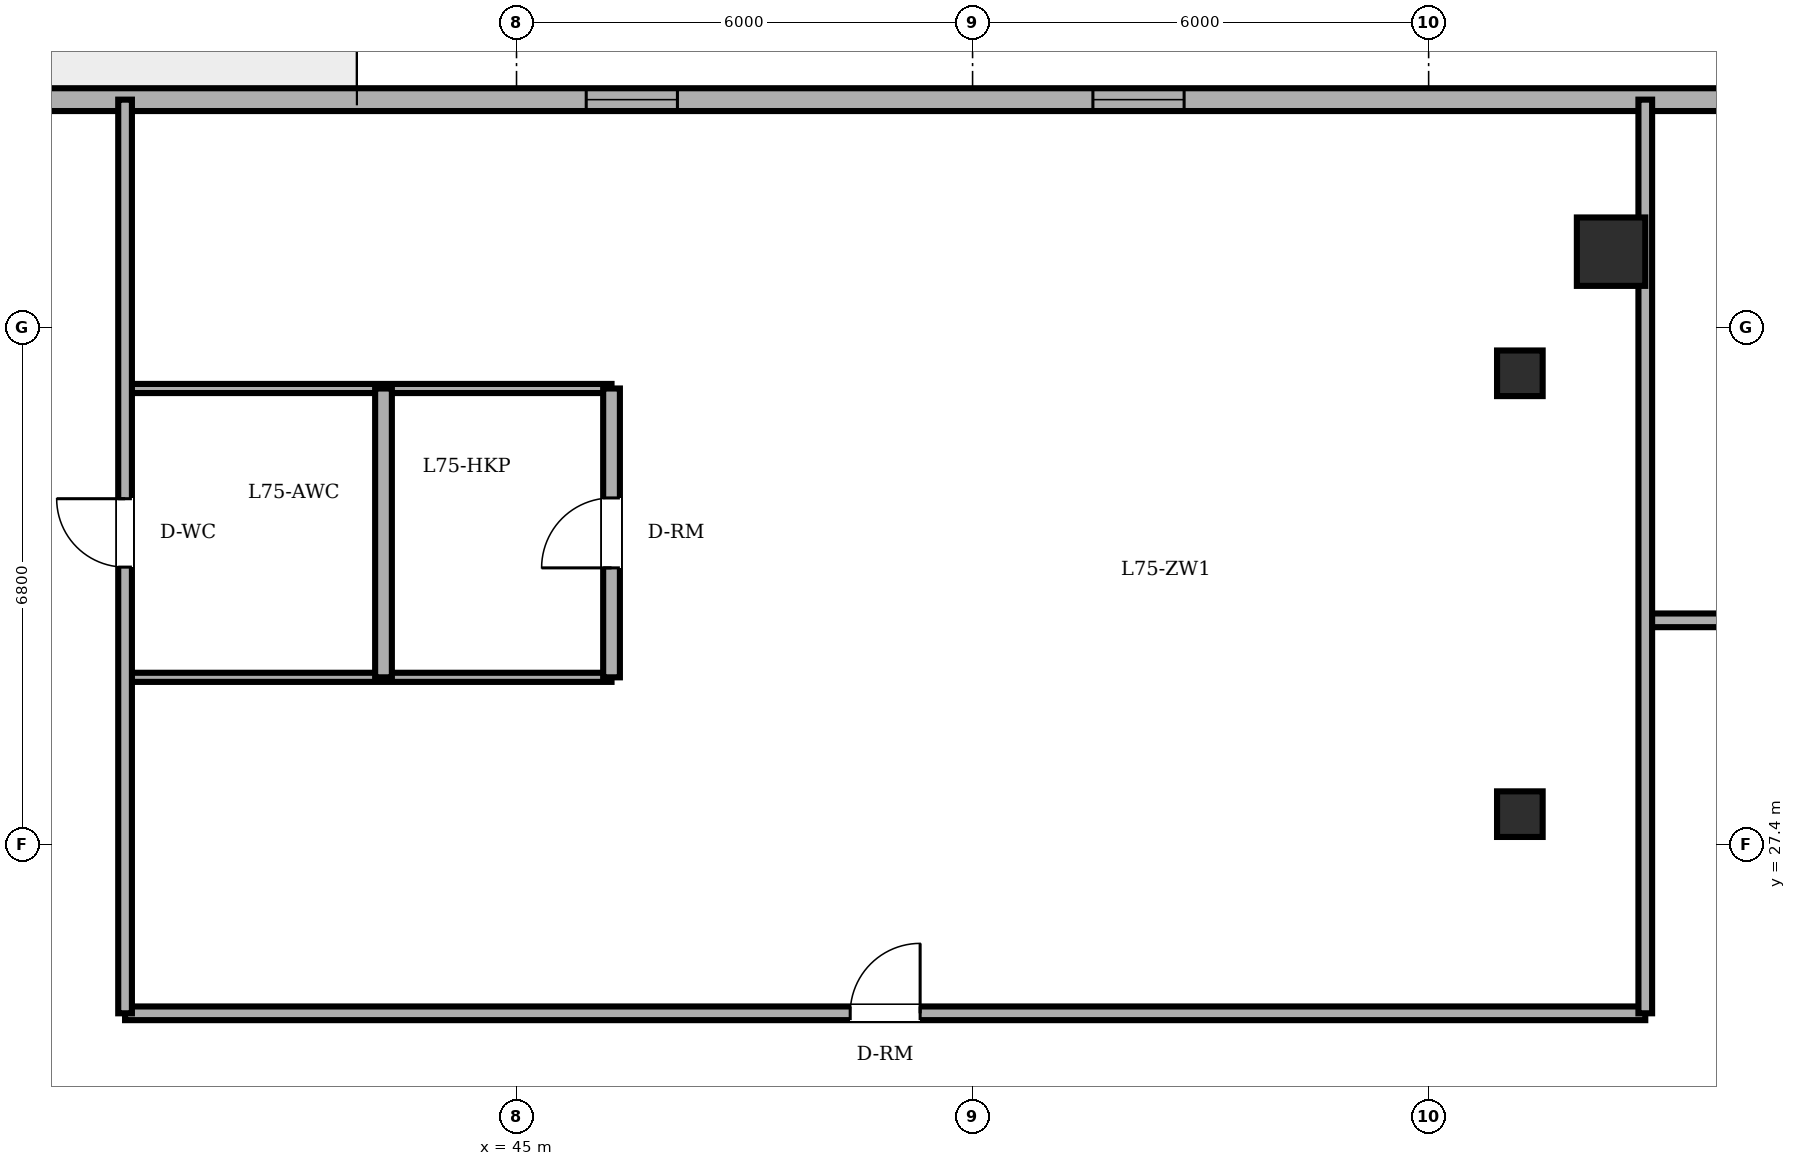
"""IFC4 building model, lengths in metres.
Left out: names, types, materials, properties, quantities, classifications, styles, units other than length and angle.
Written with IfcOpenShell. Run it as: python <this file> out.ifc"""

import sys

from ifc_helpers import new_model, si_unit, direction, frame, frame_2d, origin, origin_2d, place, context, subcontext, project, spatial, rectangle, circle, extrude, element, fill, save


model = new_model("IFC4")
c1 = context("Model", 3, precision=1e-05, world=origin(), true_north=direction((0.0, 1.0)))
c2 = subcontext(c1, "Body", "Model", "MODEL_VIEW")
j1 = project(units=[si_unit("LENGTHUNIT", "METRE"), si_unit("PLANEANGLEUNIT", "RADIAN")], contexts=[c1])
p1 = place(None, origin())
s1 = spatial("IfcSite", under=j1, at=p1, CompositionType="ELEMENT")
p2 = place(p1, origin())
s2 = spatial("IfcBuilding", under=s1, at=p2, CompositionType="ELEMENT")
p3 = place(p2, frame((0.0, 0.0, 288.0)))
s3 = spatial("IfcBuildingStorey", under=s2, at=p3, CompositionType="ELEMENT", Elevation=288.0)
p4 = place(p3, frame((59.4, 35.2, 0.0), z_axis=(0.0, 0.0, 1.0), x_axis=(1.0, 0.0, 0.0)))
e1 = element("IfcColumn", 1, at=p4, inside=s3, PredefinedType="COLUMN", context=c2, shape_type="SweptSolid", body=[
    extrude(circle(Radius=0.45, at=origin_2d()), origin(), (0.0, 0.0, 1.0), 3.65),
])
for number, where, z_axis, x_axis in (
    (2, (58.2, 27.8, 0.0), (0.0, 0.0, 1.0), (1.0, 0.0, 0.0)),
    (3, (58.2, 33.6, 0.0), (0.0, 0.0, 1.0), (1.0, 0.0, 0.0)),
):
    element("IfcColumn", number, at=place(p3, frame(where, z_axis=z_axis, x_axis=x_axis)), inside=s3, PredefinedType="COLUMN", context=c2, shape_type="SweptSolid", body=[
        extrude(rectangle(XDim=0.6, YDim=0.6, at=origin_2d()), origin(), (0.0, 0.0, 1.0), 3.65),
    ])
p5 = place(p3, frame((61.03, 37.2, 0.0), z_axis=(0.0, 0.0, 1.0), x_axis=(-1.0, 0.0, 0.0)))
e4 = element("IfcWall", 4, at=p5, inside=s3, PredefinedType="SOLIDWALL", context=c2, shape_type="SweptSolid", body=[
    extrude(rectangle(XDim=37.03, YDim=0.3, at=frame_2d((18.515, 0.0))), origin(), (0.0, 0.0, 1.0), 3.45),
])
p6 = place(p5, frame((29.655, 0.0, 0.0)))
e5 = element("IfcOpeningElement", 5, at=p6, cuts=e4, PredefinedType="OPENING", context=c2, shape_type="SweptSolid", body=[
    extrude(rectangle(XDim=0.95, YDim=2.2, at=frame_2d((0.475, 1.1))), frame((0.0, 0.16, 0.0), z_axis=(0.0, -1.0, 0.0), x_axis=(1.0, 0.0, 0.0)), (0.0, 0.0, 1.0), 0.32),
])
p7 = place(p5, frame((7.247, 0.0, 0.85)))
e6 = element("IfcOpeningElement", 6, at=p7, cuts=e4, PredefinedType="OPENING", context=c2, shape_type="SweptSolid", body=[
    extrude(rectangle(XDim=1.2, YDim=1.6, at=frame_2d((0.6, 0.8))), frame((0.0, 0.16, 0.0), z_axis=(0.0, -1.0, 0.0), x_axis=(1.0, 0.0, 0.0)), (0.0, 0.0, 1.0), 0.32),
])
p8 = place(p5, frame((13.913, 0.0, 0.85)))
e7 = element("IfcOpeningElement", 7, at=p8, cuts=e4, PredefinedType="OPENING", context=c2, shape_type="SweptSolid", body=[
    extrude(rectangle(XDim=1.2, YDim=1.6, at=frame_2d((0.6, 0.8))), frame((0.0, 0.16, 0.0), z_axis=(0.0, -1.0, 0.0), x_axis=(1.0, 0.0, 0.0)), (0.0, 0.0, 1.0), 0.32),
])
p9 = place(p5, frame((25.747, 0.0, 0.85)))
e8 = element("IfcOpeningElement", 8, at=p9, cuts=e4, PredefinedType="OPENING", context=c2, shape_type="SweptSolid", body=[
    extrude(rectangle(XDim=1.2, YDim=1.6, at=frame_2d((0.6, 0.8))), frame((0.0, 0.16, 0.0), z_axis=(0.0, -1.0, 0.0), x_axis=(1.0, 0.0, 0.0)), (0.0, 0.0, 1.0), 0.32),
])
p10 = place(p5, frame((30.913, 0.0, 0.85)))
e9 = element("IfcOpeningElement", 9, at=p10, cuts=e4, PredefinedType="OPENING", context=c2, shape_type="SweptSolid", body=[
    extrude(rectangle(XDim=1.2, YDim=1.6, at=frame_2d((0.6, 0.8))), frame((0.0, 0.16, 0.0), z_axis=(0.0, -1.0, 0.0), x_axis=(1.0, 0.0, 0.0)), (0.0, 0.0, 1.0), 0.32),
])
p11 = place(p3, frame((39.85, 25.18, 0.0), z_axis=(0.0, 0.0, 1.0), x_axis=(1.0, 0.0, 0.0)))
e10 = element("IfcWall", 10, at=p11, inside=s3, PredefinedType="PARTITIONING", context=c2, shape_type="SweptSolid", body=[
    extrude(rectangle(XDim=20.0, YDim=0.18, at=frame_2d((10.0, 0.0))), origin(), (0.0, 0.0, 1.0), 3.45),
])
p12 = place(p11, frame((9.54, 0.0, 0.0)))
e11 = element("IfcOpeningElement", 11, at=p12, cuts=e10, PredefinedType="OPENING", context=c2, shape_type="SweptSolid", body=[
    extrude(rectangle(XDim=0.92, YDim=2.1, at=frame_2d((0.46, 1.05))), frame((0.0, 0.1, 0.0), z_axis=(0.0, -1.0, 0.0), x_axis=(1.0, 0.0, 0.0)), (0.0, 0.0, 1.0), 0.2),
])
p13 = place(p3, frame((39.85, 29.6, 0.0), z_axis=(0.0, 0.0, 1.0), x_axis=(1.0, 0.0, 0.0)))
e12 = element("IfcWall", 12, at=p13, inside=s3, PredefinedType="PARTITIONING", context=c2, shape_type="SweptSolid", body=[
    extrude(rectangle(XDim=6.4, YDim=0.12, at=frame_2d((3.2, 0.0))), origin(), (0.0, 0.0, 1.0), 3.45),
])
p14 = place(p3, frame((59.85, 30.35, 0.0), z_axis=(0.0, 0.0, 1.0), x_axis=(1.0, 0.0, 0.0)))
e13 = element("IfcWall", 13, at=p14, inside=s3, PredefinedType="PARTITIONING", context=c2, shape_type="SweptSolid", body=[
    extrude(rectangle(XDim=15.139, YDim=0.18, at=frame_2d((7.569, 0.0))), origin(), (0.0, 0.0, 1.0), 3.45),
])
p15 = place(p14, frame((0.975, 0.0, 0.0)))
e14 = element("IfcOpeningElement", 14, at=p15, cuts=e13, PredefinedType="OPENING", context=c2, shape_type="SweptSolid", body=[
    extrude(rectangle(XDim=0.92, YDim=2.1, at=frame_2d((0.46, 1.05))), frame((0.0, 0.1, 0.0), z_axis=(0.0, -1.0, 0.0), x_axis=(1.0, 0.0, 0.0)), (0.0, 0.0, 1.0), 0.2),
])
p16 = place(p3, frame((39.85, 33.4, 0.0), z_axis=(0.0, 0.0, 1.0), x_axis=(1.0, 0.0, 0.0)))
e15 = element("IfcWall", 15, at=p16, inside=s3, PredefinedType="PARTITIONING", context=c2, shape_type="SweptSolid", body=[
    extrude(rectangle(XDim=6.4, YDim=0.12, at=frame_2d((3.2, 0.0))), origin(), (0.0, 0.0, 1.0), 3.092),
])
p17 = place(p3, frame((39.85, 25.18, 0.0), z_axis=(0.0, 0.0, 1.0), x_axis=(0.0, 1.0, 0.0)))
e16 = element("IfcWall", 16, at=p17, inside=s3, PredefinedType="PARTITIONING", context=c2, shape_type="SweptSolid", body=[
    extrude(rectangle(XDim=12.02, YDim=0.18, at=frame_2d((6.01, 0.0))), origin(), (0.0, 0.0, 1.0), 3.45),
])
p18 = place(p17, frame((5.87, 0.0, 0.0)))
e17 = element("IfcOpeningElement", 17, at=p18, cuts=e16, PredefinedType="OPENING", context=c2, shape_type="SweptSolid", body=[
    extrude(rectangle(XDim=0.9, YDim=2.1, at=frame_2d((0.45, 1.05))), frame((0.0, 0.1, 0.0), z_axis=(0.0, -1.0, 0.0), x_axis=(1.0, 0.0, 0.0)), (0.0, 0.0, 1.0), 0.2),
])
p19 = place(p3, frame((43.25, 29.6, 0.0), z_axis=(0.0, 0.0, 1.0), x_axis=(0.0, 1.0, 0.0)))
e18 = element("IfcWall", 18, at=p19, inside=s3, PredefinedType="PARTITIONING", context=c2, shape_type="SweptSolid", body=[
    extrude(rectangle(XDim=3.8, YDim=0.22, at=frame_2d((1.9, 0.0))), origin(), (0.0, 0.0, 1.0), 3.45),
])
p20 = place(p3, frame((46.25, 29.6, 0.0), z_axis=(0.0, 0.0, 1.0), x_axis=(0.0, 1.0, 0.0)))
e19 = element("IfcWall", 19, at=p20, inside=s3, PredefinedType="PARTITIONING", context=c2, shape_type="SweptSolid", body=[
    extrude(rectangle(XDim=3.8, YDim=0.22, at=frame_2d((1.9, 0.0))), origin(), (0.0, 0.0, 1.0), 3.45),
])
p21 = place(p20, frame((1.44, 0.0, 0.0)))
e20 = element("IfcOpeningElement", 20, at=p21, cuts=e19, PredefinedType="OPENING", context=c2, shape_type="SweptSolid", body=[
    extrude(rectangle(XDim=0.92, YDim=2.1, at=frame_2d((0.46, 1.05))), frame((0.0, 0.12, 0.0), z_axis=(0.0, -1.0, 0.0), x_axis=(1.0, 0.0, 0.0)), (0.0, 0.0, 1.0), 0.24),
])
p22 = place(p3, frame((59.85, 25.18, 0.0), z_axis=(0.0, 0.0, 1.0), x_axis=(0.0, 1.0, 0.0)))
e21 = element("IfcWall", 21, at=p22, inside=s3, PredefinedType="PARTITIONING", context=c2, shape_type="SweptSolid", body=[
    extrude(rectangle(XDim=12.02, YDim=0.18, at=frame_2d((6.01, 0.0))), origin(), (0.0, 0.0, 1.0), 3.45),
])
p23 = place(p7, origin())
e22 = element("IfcWindow", 22, at=p23, inside=s3, PartitioningType="SINGLE_PANEL", PredefinedType="WINDOW", context=c2, shape_type="SweptSolid", body=[
    extrude(rectangle(XDim=1.2, YDim=1.6, at=frame_2d((0.6, 0.8))), frame((0.0, 0.03, 0.0), z_axis=(0.0, -1.0, 0.0), x_axis=(1.0, 0.0, 0.0)), (0.0, 0.0, 1.0), 0.06),
])
fill(e6, e22)
p24 = place(p8, origin())
e23 = element("IfcWindow", 23, at=p24, inside=s3, PartitioningType="SINGLE_PANEL", PredefinedType="WINDOW", context=c2, shape_type="SweptSolid", body=[
    extrude(rectangle(XDim=1.2, YDim=1.6, at=frame_2d((0.6, 0.8))), frame((0.0, 0.03, 0.0), z_axis=(0.0, -1.0, 0.0), x_axis=(1.0, 0.0, 0.0)), (0.0, 0.0, 1.0), 0.06),
])
fill(e7, e23)
p25 = place(p18, origin())
e24 = element("IfcDoor", 24, at=p25, inside=s3, OperationType="SINGLE_SWING_RIGHT", PredefinedType="DOOR", context=c2, shape_type="SweptSolid", body=[
    extrude(rectangle(XDim=0.9, YDim=2.1, at=frame_2d((0.45, 1.05))), frame((0.0, 0.025, 0.0), z_axis=(0.0, -1.0, 0.0), x_axis=(1.0, 0.0, 0.0)), (0.0, 0.0, 1.0), 0.05),
])
fill(e17, e24)
p26 = place(p12, origin())
e25 = element("IfcDoor", 25, at=p26, inside=s3, OperationType="SINGLE_SWING_RIGHT", PredefinedType="DOOR", context=c2, shape_type="SweptSolid", body=[
    extrude(rectangle(XDim=0.92, YDim=2.1, at=frame_2d((0.46, 1.05))), frame((0.0, 0.025, 0.0), z_axis=(0.0, -1.0, 0.0), x_axis=(1.0, 0.0, 0.0)), (0.0, 0.0, 1.0), 0.05),
])
fill(e11, e25)
p27 = place(p21, origin())
e26 = element("IfcDoor", 26, at=p27, inside=s3, OperationType="SINGLE_SWING_LEFT", PredefinedType="DOOR", context=c2, shape_type="SweptSolid", body=[
    extrude(rectangle(XDim=0.92, YDim=2.1, at=frame_2d((0.46, 1.05))), frame((0.0, 0.025, 0.0), z_axis=(0.0, -1.0, 0.0), x_axis=(1.0, 0.0, 0.0)), (0.0, 0.0, 1.0), 0.05),
])
fill(e20, e26)
save(model, sys.argv[1])
